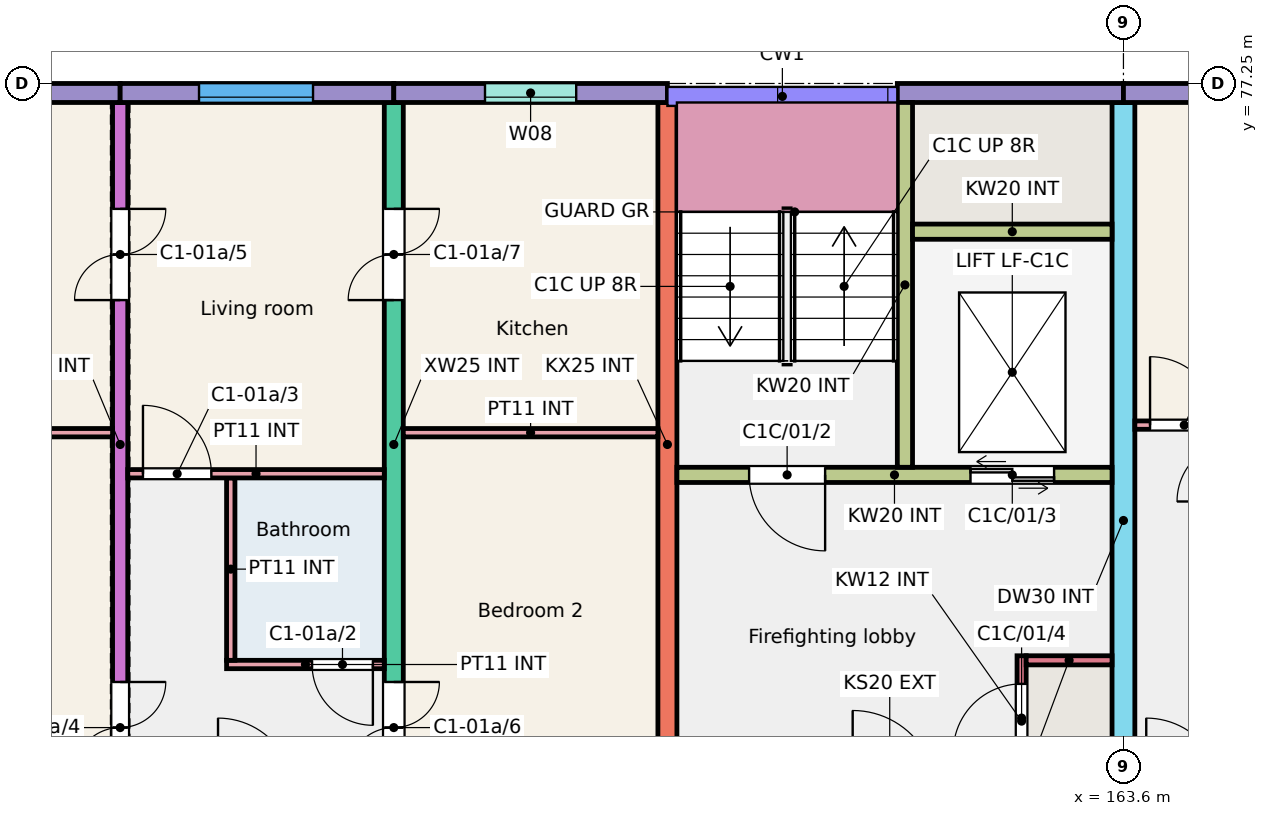
"""IFC4 building model, lengths in metres.
Left out: names, types, materials, properties, quantities, classifications, styles, units other than length and angle.
Written with IfcOpenShell. Run it as: python <this file> out.ifc"""

import sys

from ifc_helpers import new_model, si_unit, direction, frame, frame_2d, origin, place, context, subcontext, project, spatial, rectangle, extrude, element, fill, save


model = new_model("IFC4")
c1 = context("Model", 3, precision=1e-05, world=origin(), true_north=direction((0.0, 1.0)))
c2 = subcontext(c1, "Body", "Model", "MODEL_VIEW")
j1 = project(units=[si_unit("LENGTHUNIT", "METRE"), si_unit("PLANEANGLEUNIT", "RADIAN")], contexts=[c1])
p1 = place(None, origin())
s1 = spatial("IfcSite", under=j1, at=p1, CompositionType="ELEMENT")
p2 = place(p1, origin())
s2 = spatial("IfcBuilding", under=s1, at=p2, CompositionType="ELEMENT")
p3 = place(p2, frame((0.0, 0.0, 3.0)))
s3 = spatial("IfcBuildingStorey", under=s2, at=p3, CompositionType="ELEMENT", Elevation=3.0)
p4 = place(p3, frame((150.4, 68.0, 0.0), z_axis=(0.0, 0.0, 1.0), x_axis=(0.0, 1.0, 0.0)))
e1 = element("IfcWall", 1, at=p4, inside=s3, PredefinedType="SHEAR", context=c2, shape_type="SweptSolid", body=[
    extrude(rectangle(XDim=9.0, YDim=0.2, at=frame_2d((4.5, 0.0))), origin(), (0.0, 0.0, 1.0), 3.0),
])
p5 = place(p4, frame((0.175, 0.0, 0.0)))
e2 = element("IfcOpeningElement", 2, at=p5, cuts=e1, PredefinedType="OPENING", context=c2, shape_type="SweptSolid", body=[
    extrude(rectangle(XDim=1.2, YDim=2.1, at=frame_2d((0.6, 1.05))), frame((0.0, 0.11, 0.0), z_axis=(0.0, -1.0, 0.0), x_axis=(1.0, 0.0, 0.0)), (0.0, 0.0, 1.0), 0.22),
])
p6 = place(p4, frame((6.4, 0.0, 0.0)))
e3 = element("IfcOpeningElement", 3, at=p6, cuts=e1, PredefinedType="OPENING", context=c2, shape_type="SweptSolid", body=[
    extrude(rectangle(XDim=1.2, YDim=2.1, at=frame_2d((0.6, 1.05))), frame((0.0, 0.11, 0.0), z_axis=(0.0, -1.0, 0.0), x_axis=(1.0, 0.0, 0.0)), (0.0, 0.0, 1.0), 0.22),
])
p7 = place(p3, frame((154.0, 68.0, 0.0), z_axis=(0.0, 0.0, 1.0), x_axis=(0.0, 1.0, 0.0)))
e4 = element("IfcWall", 4, at=p7, inside=s3, PredefinedType="SHEAR", context=c2, shape_type="SweptSolid", body=[
    extrude(rectangle(XDim=9.0, YDim=0.25, at=frame_2d((4.5, 0.0))), origin(), (0.0, 0.0, 1.0), 3.0),
])
p8 = place(p7, frame((0.175, 0.0, 0.0)))
e5 = element("IfcOpeningElement", 5, at=p8, cuts=e4, PredefinedType="OPENING", context=c2, shape_type="SweptSolid", body=[
    extrude(rectangle(XDim=1.2, YDim=2.1, at=frame_2d((0.6, 1.05))), frame((0.0, 0.135, 0.0), z_axis=(0.0, -1.0, 0.0), x_axis=(1.0, 0.0, 0.0)), (0.0, 0.0, 1.0), 0.27),
])
p9 = place(p7, frame((6.4, 0.0, 0.0)))
e6 = element("IfcOpeningElement", 6, at=p9, cuts=e4, PredefinedType="OPENING", context=c2, shape_type="SweptSolid", body=[
    extrude(rectangle(XDim=1.2, YDim=2.1, at=frame_2d((0.6, 1.05))), frame((0.0, 0.135, 0.0), z_axis=(0.0, -1.0, 0.0), x_axis=(1.0, 0.0, 0.0)), (0.0, 0.0, 1.0), 0.27),
])
p10 = place(p3, frame((157.6, 68.0, 0.0), z_axis=(0.0, 0.0, 1.0), x_axis=(0.0, 1.0, 0.0)))
e7 = element("IfcWall", 7, at=p10, inside=s3, PredefinedType="SHEAR", context=c2, shape_type="SweptSolid", body=[
    extrude(rectangle(XDim=9.0, YDim=0.25, at=frame_2d((4.5, 0.0))), origin(), (0.0, 0.0, 1.0), 3.0),
])
p11 = place(p3, frame((163.6, 66.0, 0.0), z_axis=(0.0, 0.0, 1.0), x_axis=(0.0, 1.0, 0.0)))
e8 = element("IfcWall", 8, at=p11, inside=s3, PredefinedType="SHEAR", context=c2, shape_type="SweptSolid", body=[
    extrude(rectangle(XDim=11.0, YDim=0.3, at=frame_2d((5.5, 0.0))), origin(), (0.0, 0.0, 1.0), 3.0),
])
p12 = place(p11, frame((0.3, 0.0, 0.0)))
e9 = element("IfcOpeningElement", 9, at=p12, cuts=e8, PredefinedType="OPENING", context=c2, shape_type="SweptSolid", body=[
    extrude(rectangle(XDim=1.2, YDim=2.1, at=frame_2d((0.6, 1.05))), frame((0.0, 0.16, 0.0), z_axis=(0.0, -1.0, 0.0), x_axis=(1.0, 0.0, 0.0)), (0.0, 0.0, 1.0), 0.32),
])
p13 = place(p3, frame((146.65, 77.125, 0.0), z_axis=(0.0, 0.0, 1.0), x_axis=(1.0, 0.0, 0.0)))
e10 = element("IfcWall", 10, at=p13, inside=s3, PredefinedType="SOLIDWALL", context=c2, shape_type="SweptSolid", body=[
    extrude(rectangle(XDim=3.75, YDim=0.25, at=frame_2d((1.875, 0.0))), origin(), (0.0, 0.0, 1.0), 3.0),
])
p14 = place(p13, frame((1.225, 0.0, 0.9)))
e11 = element("IfcOpeningElement", 11, at=p14, cuts=e10, PredefinedType="OPENING", context=c2, shape_type="SweptSolid", body=[
    extrude(rectangle(XDim=1.5, YDim=1.5, at=frame_2d((0.75, 0.75))), frame((0.0, 0.135, 0.0), z_axis=(0.0, -1.0, 0.0), x_axis=(1.0, 0.0, 0.0)), (0.0, 0.0, 1.0), 0.27),
])
p15 = place(p3, frame((150.4, 77.125, 0.0), z_axis=(0.0, 0.0, 1.0), x_axis=(1.0, 0.0, 0.0)))
e12 = element("IfcWall", 12, at=p15, inside=s3, PredefinedType="SOLIDWALL", context=c2, shape_type="SweptSolid", body=[
    extrude(rectangle(XDim=3.6, YDim=0.25, at=frame_2d((1.8, 0.0))), origin(), (0.0, 0.0, 1.0), 3.0),
])
p16 = place(p15, frame((1.038, 0.0, 0.9)))
e13 = element("IfcOpeningElement", 13, at=p16, cuts=e12, PredefinedType="OPENING", context=c2, shape_type="SweptSolid", body=[
    extrude(rectangle(XDim=1.5, YDim=1.5, at=frame_2d((0.75, 0.75))), frame((0.0, 0.135, 0.0), z_axis=(0.0, -1.0, 0.0), x_axis=(1.0, 0.0, 0.0)), (0.0, 0.0, 1.0), 0.27),
])
p17 = place(p3, frame((154.0, 77.125, 0.0), z_axis=(0.0, 0.0, 1.0), x_axis=(1.0, 0.0, 0.0)))
e14 = element("IfcWall", 14, at=p17, inside=s3, PredefinedType="SOLIDWALL", context=c2, shape_type="SweptSolid", body=[
    extrude(rectangle(XDim=3.6, YDim=0.25, at=frame_2d((1.8, 0.0))), origin(), (0.0, 0.0, 1.0), 3.0),
])
p18 = place(p17, frame((1.2, 0.0, 1.1)))
e15 = element("IfcOpeningElement", 15, at=p18, cuts=e14, PredefinedType="OPENING", context=c2, shape_type="SweptSolid", body=[
    extrude(rectangle(XDim=1.2, YDim=1.3, at=frame_2d((0.6, 0.65))), frame((0.0, 0.135, 0.0), z_axis=(0.0, -1.0, 0.0), x_axis=(1.0, 0.0, 0.0)), (0.0, 0.0, 1.0), 0.27),
])
p19 = place(p3, frame((160.625, 77.125, 0.0), z_axis=(0.0, 0.0, 1.0), x_axis=(1.0, 0.0, 0.0)))
e16 = element("IfcWall", 16, at=p19, inside=s3, PredefinedType="SOLIDWALL", context=c2, shape_type="SweptSolid", body=[
    extrude(rectangle(XDim=2.975, YDim=0.25, at=frame_2d((1.488, 0.0))), origin(), (0.0, 0.0, 1.0), 3.0),
])
p20 = place(p3, frame((157.725, 72.1, 0.0), z_axis=(0.0, 0.0, 1.0), x_axis=(1.0, 0.0, 0.0)))
e17 = element("IfcWall", 17, at=p20, inside=s3, PredefinedType="SHEAR", context=c2, shape_type="SweptSolid", body=[
    extrude(rectangle(XDim=5.725, YDim=0.2, at=frame_2d((2.862, 0.0))), origin(), (0.0, 0.0, 1.0), 3.0),
])
p21 = place(p20, frame((0.95, 0.0, 0.0)))
e18 = element("IfcOpeningElement", 18, at=p21, cuts=e17, PredefinedType="OPENING", context=c2, shape_type="SweptSolid", body=[
    extrude(rectangle(XDim=1.0, YDim=2.1, at=frame_2d((0.5, 1.05))), frame((0.0, 0.11, 0.0), z_axis=(0.0, -1.0, 0.0), x_axis=(1.0, 0.0, 0.0)), (0.0, 0.0, 1.0), 0.22),
])
p22 = place(p20, frame((3.863, 0.0, 0.0)))
e19 = element("IfcOpeningElement", 19, at=p22, cuts=e17, PredefinedType="OPENING", context=c2, shape_type="SweptSolid", body=[
    extrude(rectangle(XDim=1.1, YDim=2.1, at=frame_2d((0.55, 1.05))), frame((0.0, 0.11, 0.0), z_axis=(0.0, -1.0, 0.0), x_axis=(1.0, 0.0, 0.0)), (0.0, 0.0, 1.0), 0.22),
])
p23 = place(p3, frame((160.725, 72.2, 0.0), z_axis=(0.0, 0.0, 1.0), x_axis=(0.0, 1.0, 0.0)))
e20 = element("IfcWall", 20, at=p23, inside=s3, PredefinedType="SHEAR", context=c2, shape_type="SweptSolid", body=[
    extrude(rectangle(XDim=4.8, YDim=0.2, at=frame_2d((2.4, 0.0))), origin(), (0.0, 0.0, 1.0), 3.0),
])
p24 = place(p3, frame((160.825, 75.3, 0.0), z_axis=(0.0, 0.0, 1.0), x_axis=(1.0, 0.0, 0.0)))
e21 = element("IfcWall", 21, at=p24, inside=s3, PredefinedType="SHEAR", context=c2, shape_type="SweptSolid", body=[
    extrude(rectangle(XDim=2.625, YDim=0.2, at=frame_2d((1.312, 0.0))), origin(), (0.0, 0.0, 1.0), 3.0),
])
p25 = place(p3, frame((162.26, 68.0, 0.0), z_axis=(0.0, 0.0, 1.0), x_axis=(0.0, 1.0, 0.0)))
e22 = element("IfcWall", 22, at=p25, inside=s3, PredefinedType="SHEAR", context=c2, shape_type="SweptSolid", body=[
    extrude(rectangle(XDim=1.72, YDim=0.12, at=frame_2d((0.86, 0.0))), origin(), (0.0, 0.0, 1.0), 3.0),
])
p26 = place(p25, frame((0.45, 0.0, 0.0)))
e23 = element("IfcOpeningElement", 23, at=p26, cuts=e22, PredefinedType="OPENING", context=c2, shape_type="SweptSolid", body=[
    extrude(rectangle(XDim=0.9, YDim=2.1, at=frame_2d((0.45, 1.05))), frame((0.0, 0.07, 0.0), z_axis=(0.0, -1.0, 0.0), x_axis=(1.0, 0.0, 0.0)), (0.0, 0.0, 1.0), 0.14),
])
p27 = place(p3, frame((162.32, 69.66, 0.0), z_axis=(0.0, 0.0, 1.0), x_axis=(1.0, 0.0, 0.0)))
e24 = element("IfcWall", 24, at=p27, inside=s3, PredefinedType="SHEAR", context=c2, shape_type="SweptSolid", body=[
    extrude(rectangle(XDim=1.13, YDim=0.12, at=frame_2d((0.565, 0.0))), origin(), (0.0, 0.0, 1.0), 3.0),
])
p28 = place(p3, frame((163.6, 77.125, 0.0), z_axis=(0.0, 0.0, 1.0), x_axis=(1.0, 0.0, 0.0)))
e25 = element("IfcWall", 25, at=p28, inside=s3, PredefinedType="SOLIDWALL", context=c2, shape_type="SweptSolid", body=[
    extrude(rectangle(XDim=3.6, YDim=0.25, at=frame_2d((1.8, 0.0))), origin(), (0.0, 0.0, 1.0), 3.0),
])
p29 = place(p28, frame((1.075, 0.0, 0.9)))
e26 = element("IfcOpeningElement", 26, at=p29, cuts=e25, PredefinedType="OPENING", context=c2, shape_type="SweptSolid", body=[
    extrude(rectangle(XDim=1.5, YDim=1.5, at=frame_2d((0.75, 0.75))), frame((0.0, 0.135, 0.0), z_axis=(0.0, -1.0, 0.0), x_axis=(1.0, 0.0, 0.0)), (0.0, 0.0, 1.0), 0.27),
])
p30 = place(p3, frame((151.8, 69.605, 0.0), z_axis=(0.0, 0.0, 1.0), x_axis=(1.0, 0.0, 0.0)))
e27 = element("IfcWall", 27, at=p30, inside=s3, PredefinedType="PARTITIONING", context=c2, shape_type="SweptSolid", body=[
    extrude(rectangle(XDim=2.075, YDim=0.11, at=frame_2d((1.038, 0.0))), origin(), (0.0, 0.0, 1.0), 2.8),
])
p31 = place(p30, frame((1.125, 0.0, 0.0)))
e28 = element("IfcOpeningElement", 28, at=p31, cuts=e27, PredefinedType="OPENING", context=c2, shape_type="SweptSolid", body=[
    extrude(rectangle(XDim=0.8, YDim=2.1, at=frame_2d((0.4, 1.05))), frame((0.0, 0.065, 0.0), z_axis=(0.0, -1.0, 0.0), x_axis=(1.0, 0.0, 0.0)), (0.0, 0.0, 1.0), 0.13),
])
p32 = place(p3, frame((151.855, 69.66, 0.0), z_axis=(0.0, 0.0, 1.0), x_axis=(0.0, 1.0, 0.0)))
e29 = element("IfcWall", 29, at=p32, inside=s3, PredefinedType="PARTITIONING", context=c2, shape_type="SweptSolid", body=[
    extrude(rectangle(XDim=2.4, YDim=0.11, at=frame_2d((1.2, 0.0))), origin(), (0.0, 0.0, 1.0), 2.8),
])
p33 = place(p3, frame((150.5, 72.115, 0.0), z_axis=(0.0, 0.0, 1.0), x_axis=(1.0, 0.0, 0.0)))
e30 = element("IfcWall", 30, at=p33, inside=s3, PredefinedType="PARTITIONING", context=c2, shape_type="SweptSolid", body=[
    extrude(rectangle(XDim=3.375, YDim=0.11, at=frame_2d((1.688, 0.0))), origin(), (0.0, 0.0, 1.0), 2.8),
])
p34 = place(p33, frame((0.2, 0.0, 0.0)))
e31 = element("IfcOpeningElement", 31, at=p34, cuts=e30, PredefinedType="OPENING", context=c2, shape_type="SweptSolid", body=[
    extrude(rectangle(XDim=0.9, YDim=2.1, at=frame_2d((0.45, 1.05))), frame((0.0, 0.065, 0.0), z_axis=(0.0, -1.0, 0.0), x_axis=(1.0, 0.0, 0.0)), (0.0, 0.0, 1.0), 0.13),
])
for number, where, z_axis, x_axis in (
    (32, (146.95, 72.655, 0.0), (0.0, 0.0, 1.0), (1.0, 0.0, 0.0)),
    (33, (154.125, 72.655, 0.0), (0.0, 0.0, 1.0), (1.0, 0.0, 0.0)),
):
    element("IfcWall", number, at=place(p3, frame(where, z_axis=z_axis, x_axis=x_axis)), inside=s3, PredefinedType="PARTITIONING", context=c2, shape_type="SweptSolid", body=[
        extrude(rectangle(XDim=3.35, YDim=0.11, at=frame_2d((1.675, 0.0))), origin(), (0.0, 0.0, 1.0), 2.8),
    ])
p35 = place(p3, frame((163.75, 72.755, 0.0), z_axis=(0.0, 0.0, 1.0), x_axis=(1.0, 0.0, 0.0)))
e34 = element("IfcWall", 34, at=p35, inside=s3, PredefinedType="PARTITIONING", context=c2, shape_type="SweptSolid", body=[
    extrude(rectangle(XDim=3.35, YDim=0.11, at=frame_2d((1.675, 0.0))), origin(), (0.0, 0.0, 1.0), 2.8),
])
p36 = place(p35, frame((0.2, 0.0, 0.0)))
e35 = element("IfcOpeningElement", 35, at=p36, cuts=e34, PredefinedType="OPENING", context=c2, shape_type="SweptSolid", body=[
    extrude(rectangle(XDim=0.9, YDim=2.1, at=frame_2d((0.45, 1.05))), frame((0.0, 0.065, 0.0), z_axis=(0.0, -1.0, 0.0), x_axis=(1.0, 0.0, 0.0)), (0.0, 0.0, 1.0), 0.13),
])
p37 = place(p18, origin())
e36 = element("IfcWindow", 36, at=p37, inside=s3, PartitioningType="SINGLE_PANEL", PredefinedType="WINDOW", context=c2, shape_type="SweptSolid", body=[
    extrude(rectangle(XDim=1.2, YDim=1.3, at=frame_2d((0.6, 0.65))), frame((0.0, -0.025, 0.0), z_axis=(0.0, -1.0, 0.0), x_axis=(1.0, 0.0, 0.0)), (0.0, 0.0, 1.0), 0.06),
])
fill(e15, e36)
p38 = place(p16, origin())
e37 = element("IfcWindow", 37, at=p38, inside=s3, PartitioningType="SINGLE_PANEL", PredefinedType="WINDOW", context=c2, shape_type="SweptSolid", body=[
    extrude(rectangle(XDim=1.5, YDim=1.5, at=frame_2d((0.75, 0.75))), frame((0.0, -0.025, 0.0), z_axis=(0.0, -1.0, 0.0), x_axis=(1.0, 0.0, 0.0)), (0.0, 0.0, 1.0), 0.06),
])
fill(e13, e37)
p39 = place(p31, origin())
e38 = element("IfcDoor", 38, at=p39, inside=s3, OperationType="SINGLE_SWING_RIGHT", PredefinedType="DOOR", context=c2, shape_type="SweptSolid", body=[
    extrude(rectangle(XDim=0.8, YDim=2.1, at=frame_2d((0.4, 1.05))), frame((0.0, 0.025, 0.0), z_axis=(0.0, -1.0, 0.0), x_axis=(1.0, 0.0, 0.0)), (0.0, 0.0, 1.0), 0.05),
])
fill(e28, e38)
p40 = place(p34, origin())
e39 = element("IfcDoor", 39, at=p40, inside=s3, OperationType="SINGLE_SWING_LEFT", PredefinedType="DOOR", context=c2, shape_type="SweptSolid", body=[
    extrude(rectangle(XDim=0.9, YDim=2.1, at=frame_2d((0.45, 1.05))), frame((0.0, 0.025, 0.0), z_axis=(0.0, -1.0, 0.0), x_axis=(1.0, 0.0, 0.0)), (0.0, 0.0, 1.0), 0.05),
])
fill(e31, e39)
p41 = place(p5, origin())
e40 = element("IfcDoor", 40, at=p41, inside=s3, OperationType="DOUBLE_DOOR_SINGLE_SWING", PredefinedType="DOOR", context=c2, shape_type="SweptSolid", body=[
    extrude(rectangle(XDim=1.2, YDim=2.1, at=frame_2d((0.6, 1.05))), frame((0.0, 0.025, 0.0), z_axis=(0.0, -1.0, 0.0), x_axis=(1.0, 0.0, 0.0)), (0.0, 0.0, 1.0), 0.05),
])
fill(e2, e40)
p42 = place(p6, origin())
e41 = element("IfcDoor", 41, at=p42, inside=s3, OperationType="DOUBLE_DOOR_SINGLE_SWING", PredefinedType="DOOR", context=c2, shape_type="SweptSolid", body=[
    extrude(rectangle(XDim=1.2, YDim=2.1, at=frame_2d((0.6, 1.05))), frame((0.0, 0.025, 0.0), z_axis=(0.0, -1.0, 0.0), x_axis=(1.0, 0.0, 0.0)), (0.0, 0.0, 1.0), 0.05),
])
fill(e3, e41)
p43 = place(p8, origin())
e42 = element("IfcDoor", 42, at=p43, inside=s3, OperationType="DOUBLE_DOOR_SINGLE_SWING", PredefinedType="DOOR", context=c2, shape_type="SweptSolid", body=[
    extrude(rectangle(XDim=1.2, YDim=2.1, at=frame_2d((0.6, 1.05))), frame((0.0, 0.025, 0.0), z_axis=(0.0, -1.0, 0.0), x_axis=(1.0, 0.0, 0.0)), (0.0, 0.0, 1.0), 0.05),
])
fill(e5, e42)
p44 = place(p9, origin())
e43 = element("IfcDoor", 43, at=p44, inside=s3, OperationType="DOUBLE_DOOR_SINGLE_SWING", PredefinedType="DOOR", context=c2, shape_type="SweptSolid", body=[
    extrude(rectangle(XDim=1.2, YDim=2.1, at=frame_2d((0.6, 1.05))), frame((0.0, 0.025, 0.0), z_axis=(0.0, -1.0, 0.0), x_axis=(1.0, 0.0, 0.0)), (0.0, 0.0, 1.0), 0.05),
])
fill(e6, e43)
p45 = place(p36, origin())
e44 = element("IfcDoor", 44, at=p45, inside=s3, OperationType="SINGLE_SWING_LEFT", PredefinedType="DOOR", context=c2, shape_type="SweptSolid", body=[
    extrude(rectangle(XDim=0.9, YDim=2.1, at=frame_2d((0.45, 1.05))), frame((0.0, 0.025, 0.0), z_axis=(0.0, -1.0, 0.0), x_axis=(1.0, 0.0, 0.0)), (0.0, 0.0, 1.0), 0.05),
])
fill(e35, e44)
p46 = place(p21, origin())
e45 = element("IfcDoor", 45, at=p46, inside=s3, OperationType="SINGLE_SWING_RIGHT", PredefinedType="DOOR", context=c2, shape_type="SweptSolid", body=[
    extrude(rectangle(XDim=1.0, YDim=2.1, at=frame_2d((0.5, 1.05))), frame((0.0, 0.025, 0.0), z_axis=(0.0, -1.0, 0.0), x_axis=(1.0, 0.0, 0.0)), (0.0, 0.0, 1.0), 0.05),
])
fill(e18, e45)
p47 = place(p22, origin())
e46 = element("IfcDoor", 46, at=p47, inside=s3, OperationType="DOUBLE_DOOR_SLIDING", PredefinedType="DOOR", context=c2, shape_type="SweptSolid", body=[
    extrude(rectangle(XDim=1.1, YDim=2.1, at=frame_2d((0.55, 1.05))), frame((0.0, 0.025, 0.0), z_axis=(0.0, -1.0, 0.0), x_axis=(1.0, 0.0, 0.0)), (0.0, 0.0, 1.0), 0.05),
])
fill(e19, e46)
p48 = place(p26, origin())
e47 = element("IfcDoor", 47, at=p48, inside=s3, OperationType="SINGLE_SWING_LEFT", PredefinedType="DOOR", context=c2, shape_type="SweptSolid", body=[
    extrude(rectangle(XDim=0.9, YDim=2.1, at=frame_2d((0.45, 1.05))), frame((0.0, 0.025, 0.0), z_axis=(0.0, -1.0, 0.0), x_axis=(1.0, 0.0, 0.0)), (0.0, 0.0, 1.0), 0.05),
])
fill(e23, e47)
save(model, sys.argv[1])
